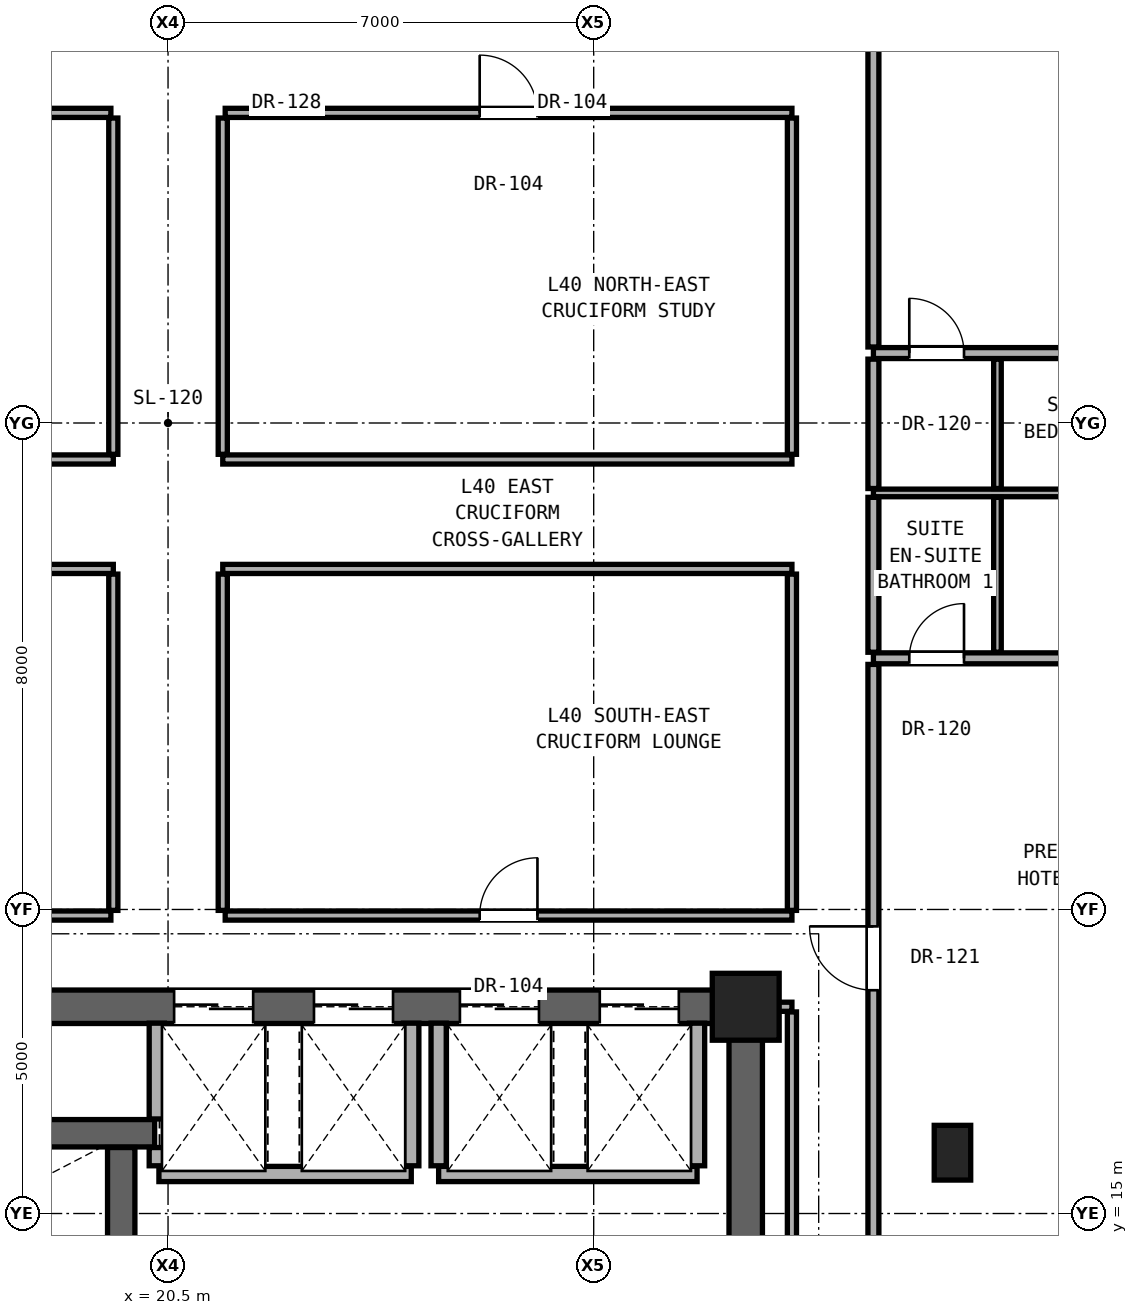
"""IFC4 building model, lengths in metres.
Left out: names, types, materials, properties, quantities, classifications, styles, units other than length and angle.
Written with IfcOpenShell. Run it as: python <this file> out.ifc"""

import sys

from ifc_helpers import new_model, si_unit, direction, frame, frame_2d, origin, origin_2d, place, context, subcontext, project, spatial, rectangle, extrude, element, fill, save


model = new_model("IFC4")
c1 = context("Model", 3, precision=1e-05, world=origin(), true_north=direction((0.0, 1.0)))
c2 = subcontext(c1, "Body", "Model", "MODEL_VIEW")
j1 = project(units=[si_unit("LENGTHUNIT", "METRE"), si_unit("PLANEANGLEUNIT", "RADIAN")], contexts=[c1])
p1 = place(None, origin())
s1 = spatial("IfcSite", under=j1, at=p1, CompositionType="ELEMENT")
p2 = place(p1, origin())
s2 = spatial("IfcBuilding", under=s1, at=p2, CompositionType="ELEMENT")
p3 = place(p2, frame((0.0, 0.0, 141.2)))
s3 = spatial("IfcBuildingStorey", under=s2, at=p3, CompositionType="ELEMENT", Elevation=141.2)
p4 = place(p3, frame((30.0, 18.4, 0.0), z_axis=(0.0, 0.0, 1.0), x_axis=(1.0, 0.0, 0.0)))
e1 = element("IfcColumn", 1, at=p4, inside=s3, PredefinedType="COLUMN", context=c2, shape_type="SweptSolid", body=[
    extrude(rectangle(XDim=1.1, YDim=1.1, at=origin_2d()), origin(), (0.0, 0.0, 1.0), 3.3),
])
p5 = place(p3, frame((33.4, 16.0, 0.0), z_axis=(0.0, 0.0, 1.0), x_axis=(1.0, 0.0, 0.0)))
e2 = element("IfcColumn", 2, at=p5, inside=s3, PredefinedType="PILASTER", context=c2, shape_type="SweptSolid", body=[
    extrude(rectangle(XDim=0.6, YDim=0.9, at=origin_2d()), origin(), (0.0, 0.0, 1.0), 3.3),
])
p6 = place(p3, frame((30.0, 12.4, 0.0), z_axis=(0.0, 0.0, 1.0), x_axis=(0.0, 1.0, 0.0)))
e3 = element("IfcWall", 3, at=p6, inside=s3, PredefinedType="SHEAR", context=c2, shape_type="SweptSolid", body=[
    extrude(rectangle(XDim=6.0, YDim=0.55, at=frame_2d((3.0, 0.0))), origin(), (0.0, 0.0, 1.0), 3.08),
])
p7 = place(p3, frame((11.0, 18.4, 0.0), z_axis=(0.0, 0.0, 1.0), x_axis=(1.0, 0.0, 0.0)))
e4 = element("IfcWall", 4, at=p7, inside=s3, PredefinedType="SHEAR", context=c2, shape_type="SweptSolid", body=[
    extrude(rectangle(XDim=19.0, YDim=0.55, at=frame_2d((9.5, 0.0))), origin(), (0.0, 0.0, 1.0), 3.08),
])
p8 = place(p7, frame((4.175, 0.0, 0.0)))
e5 = element("IfcOpeningElement", 5, at=p8, cuts=e4, PredefinedType="OPENING", context=c2, shape_type="SweptSolid", body=[
    extrude(rectangle(XDim=1.2, YDim=2.25, at=frame_2d((0.6, 1.125))), frame((0.0, 0.285, 0.0), z_axis=(0.0, -1.0, 0.0), x_axis=(1.0, 0.0, 0.0)), (0.0, 0.0, 1.0), 0.57),
])
p9 = place(p7, frame((9.6, 0.0, 0.0)))
e6 = element("IfcOpeningElement", 6, at=p9, cuts=e4, PredefinedType="OPENING", context=c2, shape_type="SweptSolid", body=[
    extrude(rectangle(XDim=1.3, YDim=2.3, at=frame_2d((0.65, 1.15))), frame((0.0, 0.285, 0.0), z_axis=(0.0, -1.0, 0.0), x_axis=(1.0, 0.0, 0.0)), (0.0, 0.0, 1.0), 0.57),
])
p10 = place(p7, frame((11.9, 0.0, 0.0)))
e7 = element("IfcOpeningElement", 7, at=p10, cuts=e4, PredefinedType="OPENING", context=c2, shape_type="SweptSolid", body=[
    extrude(rectangle(XDim=1.3, YDim=2.3, at=frame_2d((0.65, 1.15))), frame((0.0, 0.285, 0.0), z_axis=(0.0, -1.0, 0.0), x_axis=(1.0, 0.0, 0.0)), (0.0, 0.0, 1.0), 0.57),
])
p11 = place(p7, frame((14.3, 0.0, 0.0)))
e8 = element("IfcOpeningElement", 8, at=p11, cuts=e4, PredefinedType="OPENING", context=c2, shape_type="SweptSolid", body=[
    extrude(rectangle(XDim=1.3, YDim=2.3, at=frame_2d((0.65, 1.15))), frame((0.0, 0.285, 0.0), z_axis=(0.0, -1.0, 0.0), x_axis=(1.0, 0.0, 0.0)), (0.0, 0.0, 1.0), 0.57),
])
p12 = place(p7, frame((16.6, 0.0, 0.0)))
e9 = element("IfcOpeningElement", 9, at=p12, cuts=e4, PredefinedType="OPENING", context=c2, shape_type="SweptSolid", body=[
    extrude(rectangle(XDim=1.3, YDim=2.3, at=frame_2d((0.65, 1.15))), frame((0.0, 0.285, 0.0), z_axis=(0.0, -1.0, 0.0), x_axis=(1.0, 0.0, 0.0)), (0.0, 0.0, 1.0), 0.57),
])
p13 = place(p3, frame((20.35, 15.65, 0.0), z_axis=(0.0, 0.0, 1.0), x_axis=(1.0, 0.0, 0.0)))
e10 = element("IfcWall", 10, at=p13, inside=s3, PredefinedType="SOLIDWALL", context=c2, shape_type="SweptSolid", body=[
    extrude(rectangle(XDim=4.15, YDim=0.25, at=frame_2d((2.075, 0.0))), origin(), (0.0, 0.0, 1.0), 3.08),
])
p14 = place(p3, frame((24.95, 15.65, 0.0), z_axis=(0.0, 0.0, 1.0), x_axis=(1.0, 0.0, 0.0)))
e11 = element("IfcWall", 11, at=p14, inside=s3, PredefinedType="SOLIDWALL", context=c2, shape_type="SweptSolid", body=[
    extrude(rectangle(XDim=4.25, YDim=0.25, at=frame_2d((2.125, 0.0))), origin(), (0.0, 0.0, 1.0), 3.08),
])
p15 = place(p3, frame((11.27, 16.32, 0.0), z_axis=(0.0, 0.0, 1.0), x_axis=(1.0, 0.0, 0.0)))
e12 = element("IfcWall", 12, at=p15, inside=s3, PredefinedType="SHEAR", context=c2, shape_type="SweptSolid", body=[
    extrude(rectangle(XDim=9.01, YDim=0.45, at=frame_2d((4.505, 0.0))), origin(), (0.0, 0.0, 1.0), 3.08),
])
p16 = place(p15, frame((0.52, 0.0, 0.0)))
e13 = element("IfcOpeningElement", 13, at=p16, cuts=e12, PredefinedType="OPENING", context=c2, shape_type="SweptSolid", body=[
    extrude(rectangle(XDim=1.15, YDim=2.2, at=frame_2d((0.575, 1.1))), frame((0.0, 0.235, 0.0), z_axis=(0.0, -1.0, 0.0), x_axis=(1.0, 0.0, 0.0)), (0.0, 0.0, 1.0), 0.47),
])
p17 = place(p3, frame((30.27, 18.4, 0.0), z_axis=(0.0, 0.0, 1.0), x_axis=(1.0, 0.0, 0.0)))
e14 = element("IfcWall", 14, at=p17, inside=s3, PredefinedType="PARTITIONING", context=c2, shape_type="SweptSolid", body=[
    extrude(rectangle(XDim=0.49, YDim=0.15, at=frame_2d((0.245, 0.0))), origin(), (0.0, 0.0, 1.0), 2.456),
])
p18 = place(p3, frame((10.22, 19.9, 0.0), z_axis=(0.0, 0.0, 1.0), x_axis=(1.0, 0.0, 0.0)))
e15 = element("IfcWall", 15, at=p18, inside=s3, PredefinedType="PARTITIONING", context=c2, shape_type="SweptSolid", body=[
    extrude(rectangle(XDim=9.34, YDim=0.15, at=frame_2d((4.67, 0.0))), origin(), (0.0, 0.0, 1.0), 2.216),
])
p19 = place(p18, frame((1.66, 0.0, 0.0)))
e16 = element("IfcOpeningElement", 16, at=p19, cuts=e15, PredefinedType="OPENING", context=c2, shape_type="SweptSolid", body=[
    extrude(rectangle(XDim=0.9, YDim=2.1, at=frame_2d((0.45, 1.05))), frame((0.0, 0.085, 0.0), z_axis=(0.0, -1.0, 0.0), x_axis=(1.0, 0.0, 0.0)), (0.0, 0.0, 1.0), 0.17),
])
p20 = place(p18, frame((5.665, 0.0, 0.0)))
e17 = element("IfcOpeningElement", 17, at=p20, cuts=e15, PredefinedType="OPENING", context=c2, shape_type="SweptSolid", body=[
    extrude(rectangle(XDim=0.95, YDim=2.15, at=frame_2d((0.475, 1.075))), frame((0.0, 0.085, 0.0), z_axis=(0.0, -1.0, 0.0), x_axis=(1.0, 0.0, 0.0)), (0.0, 0.0, 1.0), 0.17),
])
p21 = place(p3, frame((21.44, 19.9, 0.0), z_axis=(0.0, 0.0, 1.0), x_axis=(1.0, 0.0, 0.0)))
e18 = element("IfcWall", 18, at=p21, inside=s3, PredefinedType="PARTITIONING", context=c2, shape_type="SweptSolid", body=[
    extrude(rectangle(XDim=9.32, YDim=0.15, at=frame_2d((4.66, 0.0))), origin(), (0.0, 0.0, 1.0), 2.216),
])
p22 = place(p21, frame((4.185, 0.0, 0.0)))
e19 = element("IfcOpeningElement", 19, at=p22, cuts=e18, PredefinedType="OPENING", context=c2, shape_type="SweptSolid", body=[
    extrude(rectangle(XDim=0.95, YDim=2.15, at=frame_2d((0.475, 1.075))), frame((0.0, 0.085, 0.0), z_axis=(0.0, -1.0, 0.0), x_axis=(1.0, 0.0, 0.0)), (0.0, 0.0, 1.0), 0.17),
])
p23 = place(p3, frame((32.1, 24.13, 0.0), z_axis=(0.0, 0.0, 1.0), x_axis=(1.0, 0.0, 0.0)))
e20 = element("IfcWall", 20, at=p23, inside=s3, PredefinedType="PARTITIONING", context=c2, shape_type="SweptSolid", body=[
    extrude(rectangle(XDim=10.24, YDim=0.18, at=frame_2d((5.12, 0.0))), origin(), (0.0, 0.0, 1.0), 2.299),
])
p24 = place(p23, frame((5.045, 0.0, 0.0)))
e21 = element("IfcOpeningElement", 21, at=p24, cuts=e20, PredefinedType="OPENING", context=c2, shape_type="SweptSolid", body=[
    extrude(rectangle(XDim=0.95, YDim=2.15, at=frame_2d((0.475, 1.075))), frame((0.0, 0.1, 0.0), z_axis=(0.0, -1.0, 0.0), x_axis=(1.0, 0.0, 0.0)), (0.0, 0.0, 1.0), 0.2),
])
p25 = place(p23, frame((0.59, 0.0, 0.0)))
e22 = element("IfcOpeningElement", 22, at=p25, cuts=e20, PredefinedType="OPENING", context=c2, shape_type="SweptSolid", body=[
    extrude(rectangle(XDim=0.9, YDim=2.1, at=frame_2d((0.45, 1.05))), frame((0.0, 0.1, 0.0), z_axis=(0.0, -1.0, 0.0), x_axis=(1.0, 0.0, 0.0)), (0.0, 0.0, 1.0), 0.2),
])
for number, where, z_axis, x_axis in (
    (23, (10.24, 25.6, 0.0), (0.0, 0.0, 1.0), (1.0, 0.0, 0.0)),
    (24, (21.4, 25.6, 0.0), (0.0, 0.0, 1.0), (1.0, 0.0, 0.0)),
):
    element("IfcWall", number, at=place(p3, frame(where, z_axis=z_axis, x_axis=x_axis)), inside=s3, PredefinedType="PARTITIONING", context=c2, shape_type="SweptSolid", body=[
        extrude(rectangle(XDim=9.36, YDim=0.15, at=frame_2d((4.68, 0.0))), origin(), (0.0, 0.0, 1.0), 2.216),
    ])
p26 = place(p3, frame((32.1, 26.85, 0.0), z_axis=(0.0, 0.0, 1.0), x_axis=(1.0, 0.0, 0.0)))
e25 = element("IfcWall", 25, at=p26, inside=s3, PredefinedType="PARTITIONING", context=c2, shape_type="SweptSolid", body=[
    extrude(rectangle(XDim=10.24, YDim=0.125, at=frame_2d((5.12, 0.0))), origin(), (0.0, 0.0, 1.0), 2.299),
])
for number, where, z_axis, x_axis in (
    (26, (10.24, 27.4, 0.0), (0.0, 0.0, 1.0), (1.0, 0.0, 0.0)),
    (27, (21.4, 27.4, 0.0), (0.0, 0.0, 1.0), (1.0, 0.0, 0.0)),
):
    element("IfcWall", number, at=place(p3, frame(where, z_axis=z_axis, x_axis=x_axis)), inside=s3, PredefinedType="PARTITIONING", context=c2, shape_type="SweptSolid", body=[
        extrude(rectangle(XDim=9.36, YDim=0.15, at=frame_2d((4.68, 0.0))), origin(), (0.0, 0.0, 1.0), 2.216),
    ])
p27 = place(p3, frame((32.1, 29.15, 0.0), z_axis=(0.0, 0.0, 1.0), x_axis=(1.0, 0.0, 0.0)))
e28 = element("IfcWall", 28, at=p27, inside=s3, PredefinedType="PARTITIONING", context=c2, shape_type="SweptSolid", body=[
    extrude(rectangle(XDim=10.24, YDim=0.18, at=frame_2d((5.12, 0.0))), origin(), (0.0, 0.0, 1.0), 2.299),
])
p28 = place(p27, frame((5.645, 0.0, 0.0)))
e29 = element("IfcOpeningElement", 29, at=p28, cuts=e28, PredefinedType="OPENING", context=c2, shape_type="SweptSolid", body=[
    extrude(rectangle(XDim=0.95, YDim=2.15, at=frame_2d((0.475, 1.075))), frame((0.0, 0.1, 0.0), z_axis=(0.0, -1.0, 0.0), x_axis=(1.0, 0.0, 0.0)), (0.0, 0.0, 1.0), 0.2),
])
p29 = place(p27, frame((0.59, 0.0, 0.0)))
e30 = element("IfcOpeningElement", 30, at=p29, cuts=e28, PredefinedType="OPENING", context=c2, shape_type="SweptSolid", body=[
    extrude(rectangle(XDim=0.9, YDim=2.1, at=frame_2d((0.45, 1.05))), frame((0.0, 0.1, 0.0), z_axis=(0.0, -1.0, 0.0), x_axis=(1.0, 0.0, 0.0)), (0.0, 0.0, 1.0), 0.2),
])
p30 = place(p3, frame((10.24, 33.1, 0.0), z_axis=(0.0, 0.0, 1.0), x_axis=(1.0, 0.0, 0.0)))
e31 = element("IfcWall", 31, at=p30, inside=s3, PredefinedType="PARTITIONING", context=c2, shape_type="SweptSolid", body=[
    extrude(rectangle(XDim=9.32, YDim=0.15, at=frame_2d((4.66, 0.0))), origin(), (0.0, 0.0, 1.0), 2.216),
])
p31 = place(p3, frame((21.44, 33.1, 0.0), z_axis=(0.0, 0.0, 1.0), x_axis=(1.0, 0.0, 0.0)))
e32 = element("IfcWall", 32, at=p31, inside=s3, PredefinedType="PARTITIONING", context=c2, shape_type="SweptSolid", body=[
    extrude(rectangle(XDim=9.32, YDim=0.15, at=frame_2d((4.66, 0.0))), origin(), (0.0, 0.0, 1.0), 2.216),
])
p32 = place(p31, frame((4.185, 0.0, 0.0)))
e33 = element("IfcOpeningElement", 33, at=p32, cuts=e32, PredefinedType="OPENING", context=c2, shape_type="SweptSolid", body=[
    extrude(rectangle(XDim=0.95, YDim=2.15, at=frame_2d((0.475, 1.075))), frame((0.0, 0.085, 0.0), z_axis=(0.0, -1.0, 0.0), x_axis=(1.0, 0.0, 0.0)), (0.0, 0.0, 1.0), 0.17),
])
for number, where, z_axis, x_axis in (
    (34, (19.6, 19.985, 0.0), (0.0, 0.0, 1.0), (0.0, 1.0, 0.0)),
    (35, (19.6, 27.485, 0.0), (0.0, 0.0, 1.0), (0.0, 1.0, 0.0)),
):
    element("IfcWall", number, at=place(p3, frame(where, z_axis=z_axis, x_axis=x_axis)), inside=s3, PredefinedType="PARTITIONING", context=c2, shape_type="SweptSolid", body=[
        extrude(rectangle(XDim=5.53, YDim=0.15, at=frame_2d((2.765, 0.0))), origin(), (0.0, 0.0, 1.0), 2.216),
    ])
p33 = place(p3, frame((19.73, 13.355, 0.0), z_axis=(0.0, 0.0, 1.0), x_axis=(0.0, 1.0, 0.0)))
e36 = element("IfcWall", 36, at=p33, inside=s3, PredefinedType="SHEAR", context=c2, shape_type="SweptSolid", body=[
    extrude(rectangle(XDim=2.73, YDim=0.45, at=frame_2d((1.365, 0.0))), origin(), (0.0, 0.0, 1.0), 3.08),
])
p34 = place(p3, frame((20.315, 15.785, 0.0), z_axis=(0.0, 0.0, 1.0), x_axis=(0.0, 1.0, 0.0)))
e37 = element("IfcWall", 37, at=p34, inside=s3, PredefinedType="SOLIDWALL", context=c2, shape_type="SweptSolid", body=[
    extrude(rectangle(XDim=0.3, YDim=0.25, at=frame_2d((0.15, 0.0))), origin(), (0.0, 0.0, 1.0), 3.08),
])
p35 = place(p3, frame((20.315, 16.555, 0.0), z_axis=(0.0, 0.0, 1.0), x_axis=(0.0, 1.0, 0.0)))
e38 = element("IfcWall", 38, at=p35, inside=s3, PredefinedType="SOLIDWALL", context=c2, shape_type="SweptSolid", body=[
    extrude(rectangle(XDim=1.575, YDim=0.25, at=frame_2d((0.788, 0.0))), origin(), (0.0, 0.0, 1.0), 3.08),
])
for number, where, z_axis, x_axis in (
    (39, (21.4, 19.985, 0.0), (0.0, 0.0, 1.0), (0.0, 1.0, 0.0)),
    (40, (21.4, 27.485, 0.0), (0.0, 0.0, 1.0), (0.0, 1.0, 0.0)),
):
    element("IfcWall", number, at=place(p3, frame(where, z_axis=z_axis, x_axis=x_axis)), inside=s3, PredefinedType="PARTITIONING", context=c2, shape_type="SweptSolid", body=[
        extrude(rectangle(XDim=5.53, YDim=0.15, at=frame_2d((2.765, 0.0))), origin(), (0.0, 0.0, 1.0), 2.216),
    ])
for number, where, z_axis, x_axis in (
    (41, (24.5, 15.785, 0.0), (0.0, 0.0, 1.0), (0.0, 1.0, 0.0)),
    (42, (24.95, 15.785, 0.0), (0.0, 0.0, 1.0), (0.0, 1.0, 0.0)),
    (43, (29.2, 15.785, 0.0), (0.0, 0.0, 1.0), (0.0, 1.0, 0.0)),
):
    element("IfcWall", number, at=place(p3, frame(where, z_axis=z_axis, x_axis=x_axis)), inside=s3, PredefinedType="SOLIDWALL", context=c2, shape_type="SweptSolid", body=[
        extrude(rectangle(XDim=2.345, YDim=0.25, at=frame_2d((1.172, 0.0))), origin(), (0.0, 0.0, 1.0), 3.08),
    ])
p36 = place(p3, frame((30.76, 12.335, 0.0), z_axis=(0.0, 0.0, 1.0), x_axis=(0.0, 1.0, 0.0)))
e44 = element("IfcWall", 44, at=p36, inside=s3, PredefinedType="PARTITIONING", context=c2, shape_type="SweptSolid", body=[
    extrude(rectangle(XDim=5.98, YDim=0.15, at=frame_2d((2.99, 0.0))), origin(), (0.0, 0.0, 1.0), 2.456),
])
for number, where, z_axis, x_axis in (
    (45, (30.76, 19.985, 0.0), (0.0, 0.0, 1.0), (0.0, 1.0, 0.0)),
    (46, (30.76, 27.485, 0.0), (0.0, 0.0, 1.0), (0.0, 1.0, 0.0)),
):
    element("IfcWall", number, at=place(p3, frame(where, z_axis=z_axis, x_axis=x_axis)), inside=s3, PredefinedType="PARTITIONING", context=c2, shape_type="SweptSolid", body=[
        extrude(rectangle(XDim=5.53, YDim=0.15, at=frame_2d((2.765, 0.0))), origin(), (0.0, 0.0, 1.0), 2.299),
    ])
p37 = place(p3, frame((32.1, 14.364, 0.0), z_axis=(0.0, 0.0, 1.0), x_axis=(0.0, 1.0, 0.0)))
e47 = element("IfcWall", 47, at=p37, inside=s3, PredefinedType="PARTITIONING", context=c2, shape_type="SweptSolid", body=[
    extrude(rectangle(XDim=9.666, YDim=0.18, at=frame_2d((4.833, 0.0))), origin(), (0.0, 0.0, 1.0), 2.456),
])
p38 = place(p37, frame((4.308, 0.0, 0.0)))
e48 = element("IfcOpeningElement", 48, at=p38, cuts=e47, PredefinedType="OPENING", context=c2, shape_type="SweptSolid", body=[
    extrude(rectangle(XDim=1.05, YDim=2.2, at=frame_2d((0.525, 1.1))), frame((0.0, 0.1, 0.0), z_axis=(0.0, -1.0, 0.0), x_axis=(1.0, 0.0, 0.0)), (0.0, 0.0, 1.0), 0.2),
])
p39 = place(p3, frame((32.1, 24.23, 0.0), z_axis=(0.0, 0.0, 1.0), x_axis=(0.0, 1.0, 0.0)))
e49 = element("IfcWall", 49, at=p39, inside=s3, PredefinedType="PARTITIONING", context=c2, shape_type="SweptSolid", body=[
    extrude(rectangle(XDim=2.548, YDim=0.18, at=frame_2d((1.274, 0.0))), origin(), (0.0, 0.0, 1.0), 2.299),
])
p40 = place(p3, frame((32.1, 26.923, 0.0), z_axis=(0.0, 0.0, 1.0), x_axis=(0.0, 1.0, 0.0)))
e50 = element("IfcWall", 50, at=p40, inside=s3, PredefinedType="PARTITIONING", context=c2, shape_type="SweptSolid", body=[
    extrude(rectangle(XDim=2.127, YDim=0.18, at=frame_2d((1.064, 0.0))), origin(), (0.0, 0.0, 1.0), 3.08),
])
p41 = place(p3, frame((32.1, 29.25, 0.0), z_axis=(0.0, 0.0, 1.0), x_axis=(0.0, 1.0, 0.0)))
e51 = element("IfcWall", 51, at=p41, inside=s3, PredefinedType="PARTITIONING", context=c2, shape_type="SweptSolid", body=[
    extrude(rectangle(XDim=12.386, YDim=0.18, at=frame_2d((6.193, 0.0))), origin(), (0.0, 0.0, 1.0), 2.299),
])
p42 = place(p41, frame((5.668, 0.0, 0.0)))
e52 = element("IfcOpeningElement", 52, at=p42, cuts=e51, PredefinedType="OPENING", context=c2, shape_type="SweptSolid", body=[
    extrude(rectangle(XDim=1.05, YDim=2.2, at=frame_2d((0.525, 1.1))), frame((0.0, 0.1, 0.0), z_axis=(0.0, -1.0, 0.0), x_axis=(1.0, 0.0, 0.0)), (0.0, 0.0, 1.0), 0.2),
])
p43 = place(p3, frame((34.14, 24.23, 0.0), z_axis=(0.0, 0.0, 1.0), x_axis=(0.0, 1.0, 0.0)))
e53 = element("IfcWall", 53, at=p43, inside=s3, PredefinedType="PARTITIONING", context=c2, shape_type="SweptSolid", body=[
    extrude(rectangle(XDim=2.548, YDim=0.125, at=frame_2d((1.274, 0.0))), origin(), (0.0, 0.0, 1.0), 2.299),
])
p44 = place(p3, frame((34.14, 26.923, 0.0), z_axis=(0.0, 0.0, 1.0), x_axis=(0.0, 1.0, 0.0)))
e54 = element("IfcWall", 54, at=p44, inside=s3, PredefinedType="PARTITIONING", context=c2, shape_type="SweptSolid", body=[
    extrude(rectangle(XDim=2.127, YDim=0.125, at=frame_2d((1.064, 0.0))), origin(), (0.0, 0.0, 1.0), 3.08),
])
p45 = place(p38, origin())
e55 = element("IfcDoor", 55, at=p45, inside=s3, OperationType="SINGLE_SWING_RIGHT", PredefinedType="DOOR", context=c2, shape_type="SweptSolid", body=[
    extrude(rectangle(XDim=1.05, YDim=2.2, at=frame_2d((0.525, 1.1))), frame((0.0, 0.025, 0.0), z_axis=(0.0, -1.0, 0.0), x_axis=(1.0, 0.0, 0.0)), (0.0, 0.0, 1.0), 0.05),
])
fill(e48, e55)
p46 = place(p25, origin())
e56 = element("IfcDoor", 56, at=p46, inside=s3, OperationType="SINGLE_SWING_RIGHT", PredefinedType="DOOR", context=c2, shape_type="SweptSolid", body=[
    extrude(rectangle(XDim=0.9, YDim=2.1, at=frame_2d((0.45, 1.05))), frame((0.0, 0.025, 0.0), z_axis=(0.0, -1.0, 0.0), x_axis=(1.0, 0.0, 0.0)), (0.0, 0.0, 1.0), 0.05),
])
fill(e22, e56)
p47 = place(p29, origin())
e57 = element("IfcDoor", 57, at=p47, inside=s3, OperationType="SINGLE_SWING_LEFT", PredefinedType="DOOR", context=c2, shape_type="SweptSolid", body=[
    extrude(rectangle(XDim=0.9, YDim=2.1, at=frame_2d((0.45, 1.05))), frame((0.0, 0.025, 0.0), z_axis=(0.0, -1.0, 0.0), x_axis=(1.0, 0.0, 0.0)), (0.0, 0.0, 1.0), 0.05),
])
fill(e30, e57)
p48 = place(p22, origin())
e58 = element("IfcDoor", 58, at=p48, inside=s3, OperationType="SINGLE_SWING_RIGHT", PredefinedType="DOOR", context=c2, shape_type="SweptSolid", body=[
    extrude(rectangle(XDim=0.95, YDim=2.15, at=frame_2d((0.475, 1.075))), frame((0.0, 0.025, 0.0), z_axis=(0.0, -1.0, 0.0), x_axis=(1.0, 0.0, 0.0)), (0.0, 0.0, 1.0), 0.05),
])
fill(e19, e58)
p49 = place(p32, origin())
e59 = element("IfcDoor", 59, at=p49, inside=s3, OperationType="SINGLE_SWING_LEFT", PredefinedType="DOOR", context=c2, shape_type="SweptSolid", body=[
    extrude(rectangle(XDim=0.95, YDim=2.15, at=frame_2d((0.475, 1.075))), frame((0.0, 0.025, 0.0), z_axis=(0.0, -1.0, 0.0), x_axis=(1.0, 0.0, 0.0)), (0.0, 0.0, 1.0), 0.05),
])
fill(e33, e59)
p50 = place(p9, origin())
e60 = element("IfcDoor", 60, at=p50, inside=s3, OperationType="DOUBLE_DOOR_SLIDING", PredefinedType="DOOR", context=c2, shape_type="SweptSolid", body=[
    extrude(rectangle(XDim=1.3, YDim=2.3, at=frame_2d((0.65, 1.15))), frame((0.0, 0.025, 0.0), z_axis=(0.0, -1.0, 0.0), x_axis=(1.0, 0.0, 0.0)), (0.0, 0.0, 1.0), 0.05),
])
fill(e6, e60)
p51 = place(p10, origin())
e61 = element("IfcDoor", 61, at=p51, inside=s3, OperationType="DOUBLE_DOOR_SLIDING", PredefinedType="DOOR", context=c2, shape_type="SweptSolid", body=[
    extrude(rectangle(XDim=1.3, YDim=2.3, at=frame_2d((0.65, 1.15))), frame((0.0, 0.025, 0.0), z_axis=(0.0, -1.0, 0.0), x_axis=(1.0, 0.0, 0.0)), (0.0, 0.0, 1.0), 0.05),
])
fill(e7, e61)
p52 = place(p11, origin())
e62 = element("IfcDoor", 62, at=p52, inside=s3, OperationType="DOUBLE_DOOR_SLIDING", PredefinedType="DOOR", context=c2, shape_type="SweptSolid", body=[
    extrude(rectangle(XDim=1.3, YDim=2.3, at=frame_2d((0.65, 1.15))), frame((0.0, 0.025, 0.0), z_axis=(0.0, -1.0, 0.0), x_axis=(1.0, 0.0, 0.0)), (0.0, 0.0, 1.0), 0.05),
])
fill(e8, e62)
p53 = place(p12, origin())
e63 = element("IfcDoor", 63, at=p53, inside=s3, OperationType="DOUBLE_DOOR_SLIDING", PredefinedType="DOOR", context=c2, shape_type="SweptSolid", body=[
    extrude(rectangle(XDim=1.3, YDim=2.3, at=frame_2d((0.65, 1.15))), frame((0.0, 0.025, 0.0), z_axis=(0.0, -1.0, 0.0), x_axis=(1.0, 0.0, 0.0)), (0.0, 0.0, 1.0), 0.05),
])
fill(e9, e63)
save(model, sys.argv[1])
